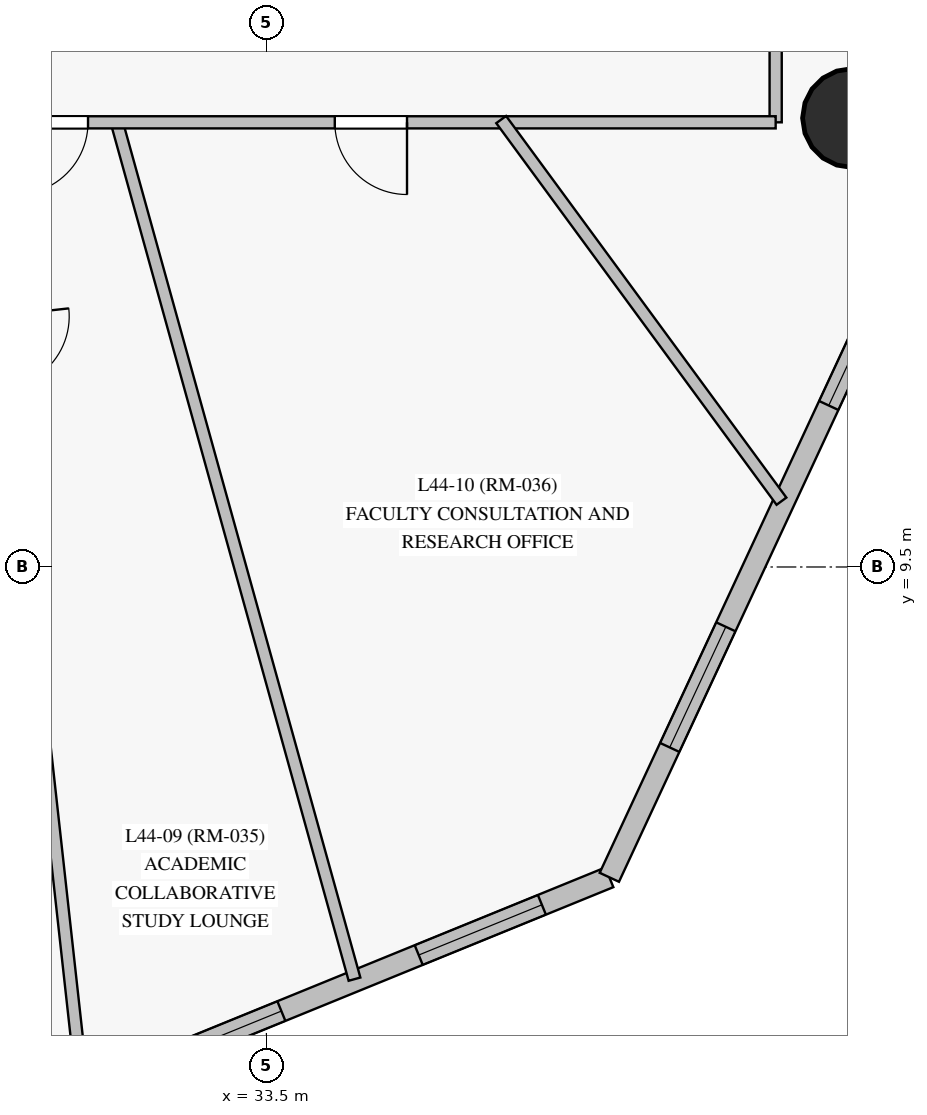
"""IFC4 building model, lengths in metres.
Left out: names, types, materials, properties, quantities, classifications, styles, units other than length and angle.
Written with IfcOpenShell. Run it as: python <this file> out.ifc"""

import sys

from ifc_helpers import new_model, si_unit, direction, frame, frame_2d, origin, origin_with_axes, origin_2d, place, context, subcontext, project, spatial, rectangle, circle, extrude, source, transform, mapped, element, fill, save


model = new_model("IFC4")
c1 = context("Model", 3, precision=1e-05, world=origin(), true_north=direction((0.0, 1.0)))
c2 = subcontext(c1, "Body", "Model", "MODEL_VIEW")
j1 = project(units=[si_unit("LENGTHUNIT", "METRE"), si_unit("PLANEANGLEUNIT", "RADIAN")], contexts=[c1])
p1 = place(None, origin())
s1 = spatial("IfcSite", under=j1, at=p1, CompositionType="ELEMENT")
p2 = place(p1, origin())
s2 = spatial("IfcBuilding", under=s1, at=p2, CompositionType="ELEMENT")
p3 = place(p2, frame((0.0, 0.0, 156.55)))
s3 = spatial("IfcBuildingStorey", under=s2, at=p3, CompositionType="ELEMENT", Elevation=156.55)
m1 = source(origin_with_axes(), c2, "Body", "SweptSolid", [
    extrude(circle(Radius=0.65, at=origin_2d()), origin(), (0.0, 0.0, 1.0), 3.05),
])
p4 = place(p3, frame((41.204, 15.406, 0.0), z_axis=(0.0, 0.0, 1.0), x_axis=(1.0, 0.0, 0.0)))
e1 = element("IfcColumn", 1, at=p4, inside=s3, PredefinedType="COLUMN", context=c2, shape_type="MappedRepresentation", body=[
    mapped(m1, transform((0.0, 0.0, 0.0), scale=1.0)),
])
p5 = place(p3, frame((29.265, 1.85, 0.0), z_axis=(0.0, 0.0, 1.0), x_axis=(0.925942104455, 0.377665485842, 0.0)))
e2 = element("IfcWall", 2, at=p5, inside=s3, PredefinedType="SOLIDWALL", context=c2, shape_type="SweptSolid", body=[
    extrude(rectangle(XDim=9.446, YDim=0.28, at=frame_2d((4.723, 0.0))), origin(), (0.0, 0.0, 1.0), 2.825),
])
p6 = place(p5, frame((0.546, 0.0, 0.85)))
e3 = element("IfcOpeningElement", 3, at=p6, cuts=e2, PredefinedType="OPENING", context=c2, shape_type="SweptSolid", body=[
    extrude(rectangle(XDim=0.95, YDim=1.5, at=frame_2d((0.475, 0.75))), frame((0.0, 0.15, 0.0), z_axis=(0.0, -1.0, 0.0), x_axis=(1.0, 0.0, 0.0)), (0.0, 0.0, 1.0), 0.3),
])
p7 = place(p5, frame((3.036, 0.0, 0.85)))
e4 = element("IfcOpeningElement", 4, at=p7, cuts=e2, PredefinedType="OPENING", context=c2, shape_type="SweptSolid", body=[
    extrude(rectangle(XDim=1.75, YDim=1.65, at=frame_2d((0.875, 0.825))), frame((0.0, 0.15, 0.0), z_axis=(0.0, -1.0, 0.0), x_axis=(1.0, 0.0, 0.0)), (0.0, 0.0, 1.0), 0.3),
])
p8 = place(p5, frame((6.738, 0.0, 0.85)))
e5 = element("IfcOpeningElement", 5, at=p8, cuts=e2, PredefinedType="OPENING", context=c2, shape_type="SweptSolid", body=[
    extrude(rectangle(XDim=1.75, YDim=1.65, at=frame_2d((0.875, 0.825))), frame((0.0, 0.15, 0.0), z_axis=(0.0, -1.0, 0.0), x_axis=(1.0, 0.0, 0.0)), (0.0, 0.0, 1.0), 0.3),
])
p9 = place(p3, frame((38.012, 5.417, 0.0), z_axis=(0.0, 0.0, 1.0), x_axis=(0.421677791248, 0.906745741853, 0.0)))
e6 = element("IfcWall", 6, at=p9, inside=s3, PredefinedType="SOLIDWALL", context=c2, shape_type="SweptSolid", body=[
    extrude(rectangle(XDim=13.927, YDim=0.28, at=frame_2d((6.963, 0.0))), origin(), (0.0, 0.0, 1.0), 2.825),
])
p10 = place(p9, frame((1.884, 0.0, 0.85)))
e7 = element("IfcOpeningElement", 7, at=p10, cuts=e6, PredefinedType="OPENING", context=c2, shape_type="SweptSolid", body=[
    extrude(rectangle(XDim=1.75, YDim=1.65, at=frame_2d((0.875, 0.825))), frame((0.0, 0.15, 0.0), z_axis=(0.0, -1.0, 0.0), x_axis=(1.0, 0.0, 0.0)), (0.0, 0.0, 1.0), 0.3),
])
p11 = place(p9, frame((6.846, 0.0, 0.85)))
e8 = element("IfcOpeningElement", 8, at=p11, cuts=e6, PredefinedType="OPENING", context=c2, shape_type="SweptSolid", body=[
    extrude(rectangle(XDim=1.75, YDim=1.65, at=frame_2d((0.875, 0.825))), frame((0.0, 0.15, 0.0), z_axis=(0.0, -1.0, 0.0), x_axis=(1.0, 0.0, 0.0)), (0.0, 0.0, 1.0), 0.3),
])
p12 = place(p9, frame((10.729, 0.0, 0.85)))
e9 = element("IfcOpeningElement", 9, at=p12, cuts=e6, PredefinedType="OPENING", context=c2, shape_type="SweptSolid", body=[
    extrude(rectangle(XDim=1.75, YDim=1.65, at=frame_2d((0.875, 0.825))), frame((0.0, 0.15, 0.0), z_axis=(0.0, -1.0, 0.0), x_axis=(1.0, 0.0, 0.0)), (0.0, 0.0, 1.0), 0.3),
])
p13 = place(p3, frame((40.2, 37.65, 0.0), z_axis=(0.0, 0.0, 1.0), x_axis=(0.0, -1.0, 0.0)))
e10 = element("IfcWall", 10, at=p13, inside=s3, PredefinedType="PARTITIONING", context=c2, shape_type="SweptSolid", body=[
    extrude(rectangle(XDim=22.3, YDim=0.16, at=frame_2d((11.15, 0.0))), origin(), (0.0, 0.0, 1.0), 2.375),
])
p14 = place(p13, frame((16.25, 0.0, 0.0)))
e11 = element("IfcOpeningElement", 11, at=p14, cuts=e10, PredefinedType="OPENING", context=c2, shape_type="SweptSolid", body=[
    extrude(rectangle(XDim=0.95, YDim=2.15, at=frame_2d((0.475, 1.075))), frame((0.0, 0.09, 0.0), z_axis=(0.0, -1.0, 0.0), x_axis=(1.0, 0.0, 0.0)), (0.0, 0.0, 1.0), 0.18),
])
p15 = place(p13, frame((11.115, 0.0, 0.0)))
e12 = element("IfcOpeningElement", 12, at=p15, cuts=e10, PredefinedType="OPENING", context=c2, shape_type="SweptSolid", body=[
    extrude(rectangle(XDim=0.95, YDim=2.15, at=frame_2d((0.475, 1.075))), frame((0.0, 0.09, 0.0), z_axis=(0.0, -1.0, 0.0), x_axis=(1.0, 0.0, 0.0)), (0.0, 0.0, 1.0), 0.18),
])
p16 = place(p13, frame((7.33, 0.0, 0.0)))
e13 = element("IfcOpeningElement", 13, at=p16, cuts=e10, PredefinedType="OPENING", context=c2, shape_type="SweptSolid", body=[
    extrude(rectangle(XDim=0.95, YDim=2.15, at=frame_2d((0.475, 1.075))), frame((0.0, 0.09, 0.0), z_axis=(0.0, -1.0, 0.0), x_axis=(1.0, 0.0, 0.0)), (0.0, 0.0, 1.0), 0.18),
])
p17 = place(p13, frame((5.01, 0.0, 0.0)))
e14 = element("IfcOpeningElement", 14, at=p17, cuts=e10, PredefinedType="OPENING", context=c2, shape_type="SweptSolid", body=[
    extrude(rectangle(XDim=0.95, YDim=2.15, at=frame_2d((0.475, 1.075))), frame((0.0, 0.09, 0.0), z_axis=(0.0, -1.0, 0.0), x_axis=(1.0, 0.0, 0.0)), (0.0, 0.0, 1.0), 0.18),
])
p18 = place(p3, frame((29.67, 15.38, 0.0), z_axis=(0.0, 0.0, 1.0), x_axis=(0.109963941435, -0.99393557718, 0.0)))
e15 = element("IfcWall", 15, at=p18, inside=s3, PredefinedType="PARTITIONING", context=c2, shape_type="SweptSolid", body=[
    extrude(rectangle(XDim=12.837, YDim=0.16, at=frame_2d((6.418, 0.0))), origin(), (0.0, 0.0, 1.0), 2.825),
])
p19 = place(p18, frame((2.598, 0.0, 0.0)))
e16 = element("IfcOpeningElement", 16, at=p19, cuts=e15, PredefinedType="OPENING", context=c2, shape_type="SweptSolid", body=[
    extrude(rectangle(XDim=0.95, YDim=2.15, at=frame_2d((0.475, 1.075))), frame((0.0, 0.09, 0.0), z_axis=(0.0, -1.0, 0.0), x_axis=(1.0, 0.0, 0.0)), (0.0, 0.0, 1.0), 0.18),
])
p20 = place(p3, frame((31.523, 15.379, 0.0), z_axis=(0.0, 0.0, 1.0), x_axis=(0.267361493454, -0.963596301268, 0.0)))
e17 = element("IfcWall", 17, at=p20, inside=s3, PredefinedType="PARTITIONING", context=c2, shape_type="SweptSolid", body=[
    extrude(rectangle(XDim=11.729, YDim=0.16, at=frame_2d((5.864, 0.0))), origin(), (0.0, 0.0, 1.0), 2.825),
])
p21 = place(p3, frame((40.2, 15.35, 0.0), z_axis=(0.0, 0.0, 1.0), x_axis=(-1.0, 0.0, 0.0)))
e18 = element("IfcWall", 18, at=p21, inside=s3, PredefinedType="PARTITIONING", context=c2, shape_type="SweptSolid", body=[
    extrude(rectangle(XDim=10.65, YDim=0.16, at=frame_2d((5.325, 0.0))), origin(), (0.0, 0.0, 1.0), 2.275),
])
p22 = place(p21, frame((9.047, 0.0, 0.0)))
e19 = element("IfcOpeningElement", 19, at=p22, cuts=e18, PredefinedType="OPENING", context=c2, shape_type="SweptSolid", body=[
    extrude(rectangle(XDim=0.95, YDim=2.15, at=frame_2d((0.475, 1.075))), frame((0.0, 0.09, 0.0), z_axis=(0.0, -1.0, 0.0), x_axis=(1.0, 0.0, 0.0)), (0.0, 0.0, 1.0), 0.18),
])
p23 = place(p21, frame((4.85, 0.0, 0.0)))
e20 = element("IfcOpeningElement", 20, at=p23, cuts=e18, PredefinedType="OPENING", context=c2, shape_type="SweptSolid", body=[
    extrude(rectangle(XDim=0.95, YDim=2.15, at=frame_2d((0.475, 1.075))), frame((0.0, 0.09, 0.0), z_axis=(0.0, -1.0, 0.0), x_axis=(1.0, 0.0, 0.0)), (0.0, 0.0, 1.0), 0.18),
])
p24 = place(p3, frame((36.589, 15.386, 0.0), z_axis=(0.0, 0.0, 1.0), x_axis=(0.591975139888, -0.805956223224, 0.0)))
e21 = element("IfcWall", 21, at=p24, inside=s3, PredefinedType="PARTITIONING", context=c2, shape_type="SweptSolid", body=[
    extrude(rectangle(XDim=6.229, YDim=0.16, at=frame_2d((3.115, 0.0))), origin(), (0.0, 0.0, 1.0), 2.825),
])
m2 = source(origin_with_axes(), c2, "Body", "SweptSolid", [
    extrude(rectangle(XDim=1.75, YDim=1.65, at=frame_2d((0.875, 0.825))), frame((0.0, 0.03, 0.0), z_axis=(0.0, -1.0, 0.0), x_axis=(1.0, 0.0, 0.0)), (0.0, 0.0, 1.0), 0.06),
])
p25 = place(p7, origin())
e22 = element("IfcWindow", 22, at=p25, inside=s3, PartitioningType="SINGLE_PANEL", PredefinedType="WINDOW", context=c2, shape_type="MappedRepresentation", body=[
    mapped(m2, transform((0.0, 0.0, 0.0), scale=1.0)),
])
fill(e4, e22)
p26 = place(p8, origin())
e23 = element("IfcWindow", 23, at=p26, inside=s3, PartitioningType="SINGLE_PANEL", PredefinedType="WINDOW", context=c2, shape_type="MappedRepresentation", body=[
    mapped(m2, transform((0.0, 0.0, 0.0), scale=1.0)),
])
fill(e5, e23)
p27 = place(p10, origin())
e24 = element("IfcWindow", 24, at=p27, inside=s3, PartitioningType="SINGLE_PANEL", PredefinedType="WINDOW", context=c2, shape_type="MappedRepresentation", body=[
    mapped(m2, transform((0.0, 0.0, 0.0), scale=1.0)),
])
fill(e7, e24)
p28 = place(p11, origin())
e25 = element("IfcWindow", 25, at=p28, inside=s3, PartitioningType="SINGLE_PANEL", PredefinedType="WINDOW", context=c2, shape_type="MappedRepresentation", body=[
    mapped(m2, transform((0.0, 0.0, 0.0), scale=1.0)),
])
fill(e8, e25)
m3 = source(origin_with_axes(), c2, "Body", "SweptSolid", [
    extrude(rectangle(XDim=0.95, YDim=2.15, at=frame_2d((0.475, 1.075))), frame((0.0, 0.025, 0.0), z_axis=(0.0, -1.0, 0.0), x_axis=(1.0, 0.0, 0.0)), (0.0, 0.0, 1.0), 0.05),
])
p29 = place(p22, origin())
e26 = element("IfcDoor", 26, at=p29, inside=s3, OperationType="SINGLE_SWING_RIGHT", PredefinedType="DOOR", context=c2, shape_type="MappedRepresentation", body=[
    mapped(m3, transform((0.0, 0.0, 0.0), scale=1.0)),
])
fill(e19, e26)
p30 = place(p23, origin())
e27 = element("IfcDoor", 27, at=p30, inside=s3, OperationType="SINGLE_SWING_LEFT", PredefinedType="DOOR", context=c2, shape_type="MappedRepresentation", body=[
    mapped(m3, transform((0.0, 0.0, 0.0), scale=1.0)),
])
fill(e20, e27)
save(model, sys.argv[1])
